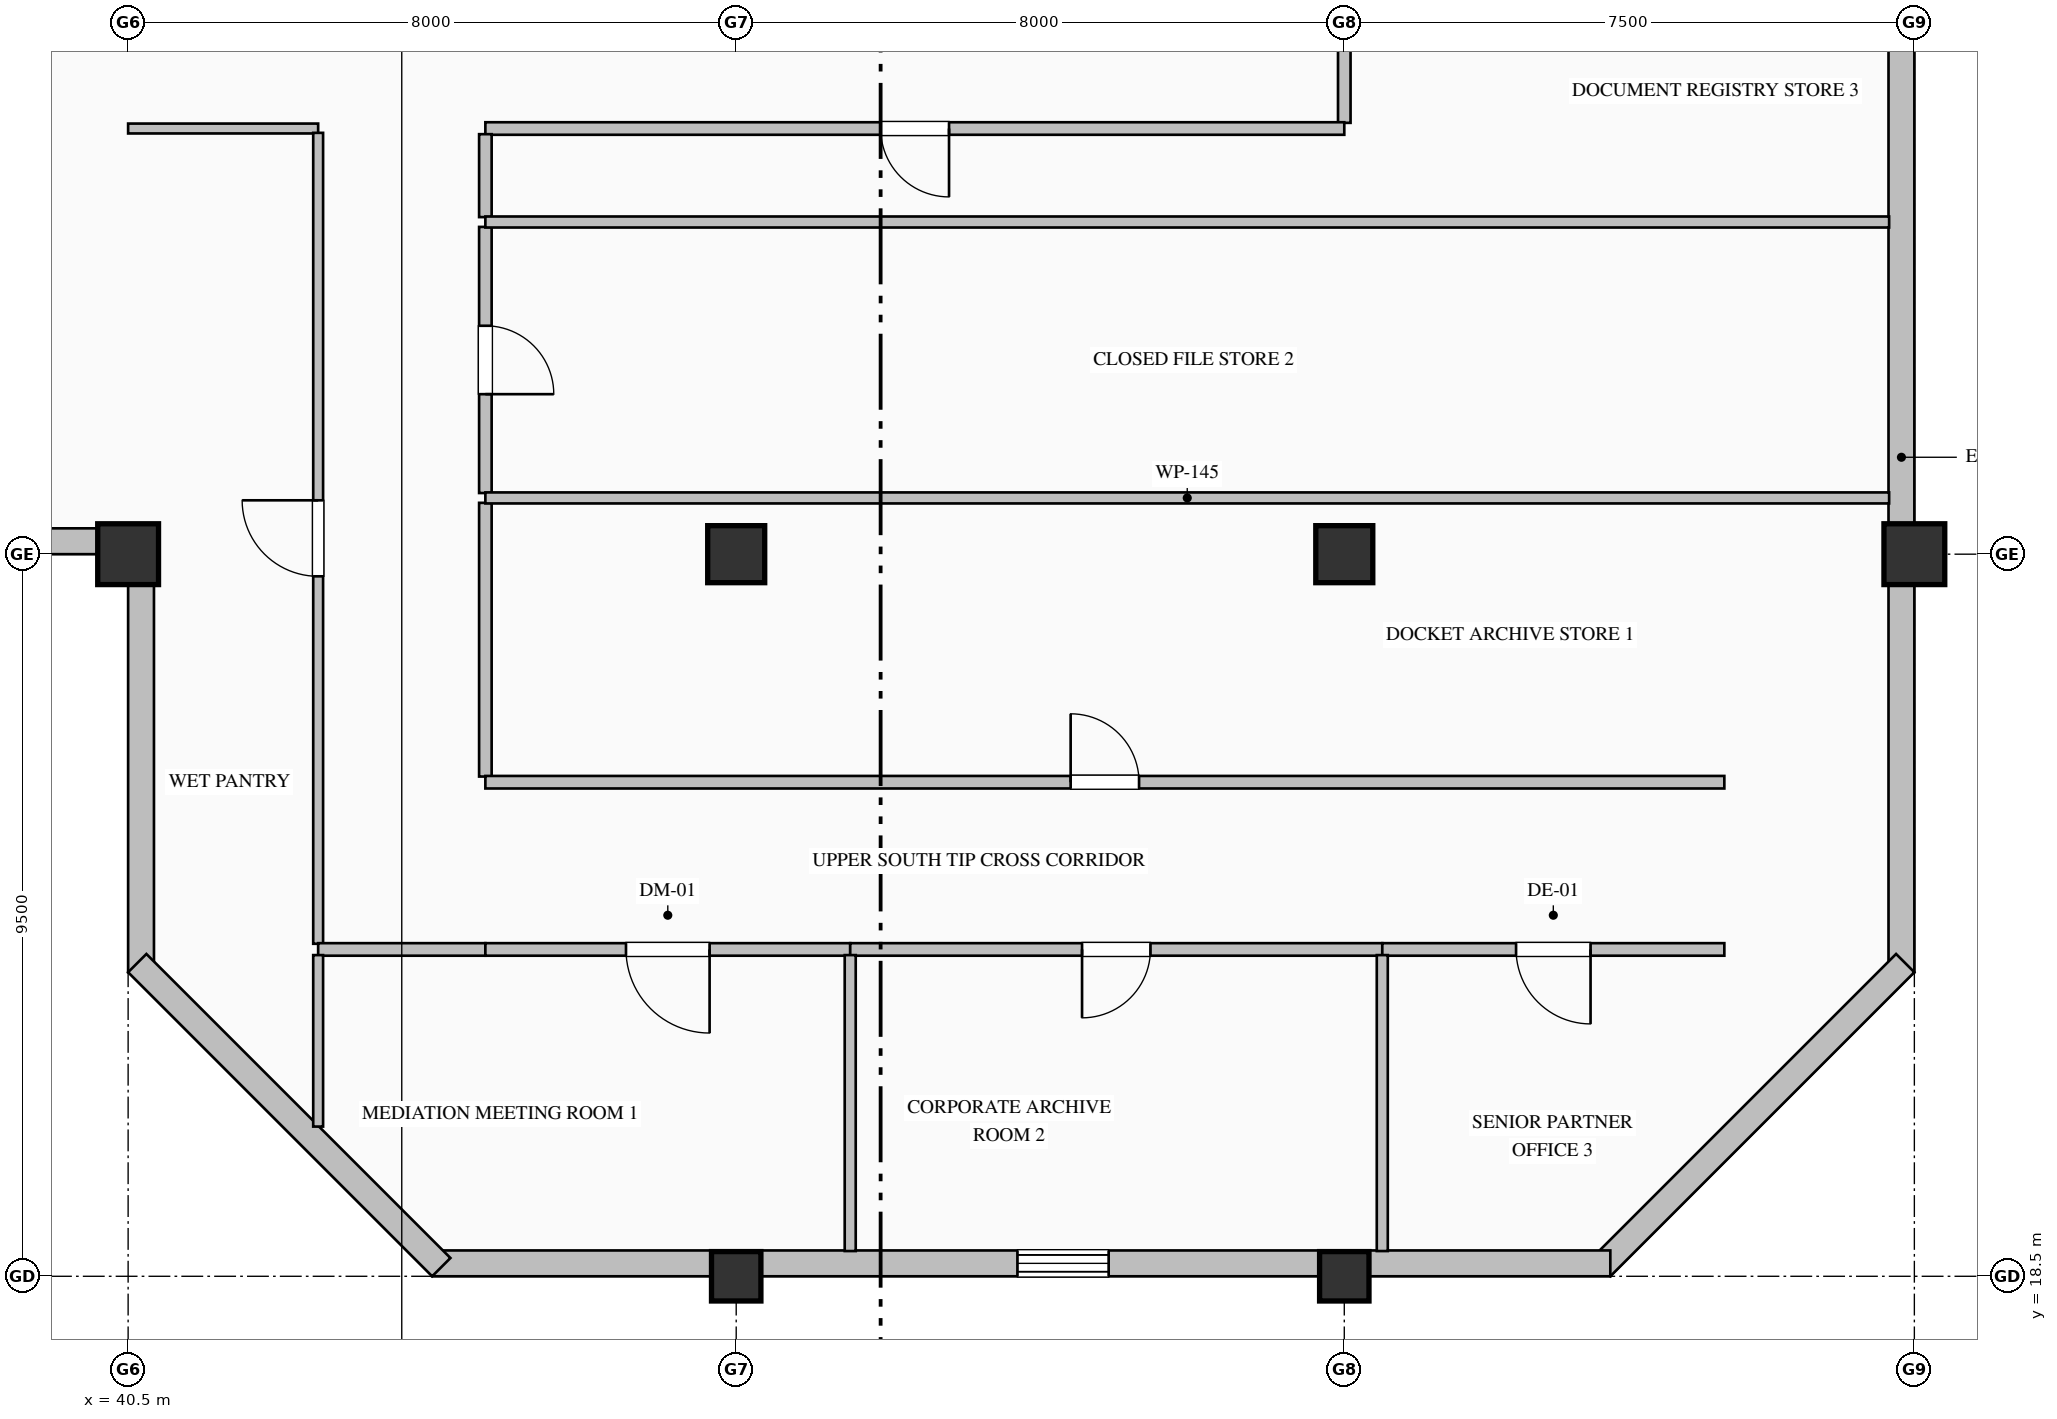
"""IFC4 building model, lengths in metres.
Left out: names, types, materials, properties, quantities, classifications, styles, units other than length and angle.
Written with IfcOpenShell. Run it as: python <this file> out.ifc"""

import sys

from ifc_helpers import new_model, si_unit, direction, frame, frame_2d, origin, origin_2d, place, context, subcontext, project, spatial, rectangle, hollow_rectangle, extrude, element, fill, save


model = new_model("IFC4")
c1 = context("Model", 3, precision=1e-05, world=origin(), true_north=direction((0.0, 1.0)))
c2 = subcontext(c1, "Body", "Model", "MODEL_VIEW")
j1 = project(units=[si_unit("LENGTHUNIT", "METRE"), si_unit("PLANEANGLEUNIT", "RADIAN")], contexts=[c1])
p1 = place(None, origin())
s1 = spatial("IfcSite", under=j1, at=p1, CompositionType="ELEMENT")
p2 = place(p1, origin())
s2 = spatial("IfcBuilding", under=s1, at=p2, CompositionType="ELEMENT")
p3 = place(p2, frame((0.0, 0.0, 363.2)))
s3 = spatial("IfcBuildingStorey", under=s2, at=p3, CompositionType="ELEMENT", Elevation=363.2)
p4 = place(p3, frame((40.5, 28.0, 0.0), z_axis=(0.0, 0.0, 1.0), x_axis=(1.0, 0.0, 0.0)))
e1 = element("IfcColumn", 1, at=p4, inside=s3, PredefinedType="COLUMN", context=c2, shape_type="SweptSolid", body=[
    extrude(hollow_rectangle(XDim=0.8, YDim=0.8, WallThickness=0.032, at=origin_2d()), origin(), (0.0, 0.0, 1.0), 4.0),
])
p5 = place(p3, frame((48.5, 18.5, 0.0), z_axis=(0.0, 0.0, 1.0), x_axis=(1.0, 0.0, 0.0)))
e2 = element("IfcColumn", 2, at=p5, inside=s3, PredefinedType="COLUMN", context=c2, shape_type="SweptSolid", body=[
    extrude(hollow_rectangle(XDim=0.65, YDim=0.65, WallThickness=0.028, at=origin_2d()), origin(), (0.0, 0.0, 1.0), 4.0),
])
p6 = place(p3, frame((48.5, 28.0, 0.0), z_axis=(0.0, 0.0, 1.0), x_axis=(1.0, 0.0, 0.0)))
e3 = element("IfcColumn", 3, at=p6, inside=s3, PredefinedType="COLUMN", context=c2, shape_type="SweptSolid", body=[
    extrude(rectangle(XDim=0.75, YDim=0.75, at=origin_2d()), origin(), (0.0, 0.0, 1.0), 4.0),
])
p7 = place(p3, frame((56.5, 18.5, 0.0), z_axis=(0.0, 0.0, 1.0), x_axis=(1.0, 0.0, 0.0)))
e4 = element("IfcColumn", 4, at=p7, inside=s3, PredefinedType="COLUMN", context=c2, shape_type="SweptSolid", body=[
    extrude(hollow_rectangle(XDim=0.65, YDim=0.65, WallThickness=0.028, at=origin_2d()), origin(), (0.0, 0.0, 1.0), 4.0),
])
p8 = place(p3, frame((56.5, 28.0, 0.0), z_axis=(0.0, 0.0, 1.0), x_axis=(1.0, 0.0, 0.0)))
e5 = element("IfcColumn", 5, at=p8, inside=s3, PredefinedType="COLUMN", context=c2, shape_type="SweptSolid", body=[
    extrude(rectangle(XDim=0.75, YDim=0.75, at=origin_2d()), origin(), (0.0, 0.0, 1.0), 4.0),
])
p9 = place(p3, frame((64.0, 28.0, 0.0), z_axis=(0.0, 0.0, 1.0), x_axis=(1.0, 0.0, 0.0)))
e6 = element("IfcColumn", 6, at=p9, inside=s3, PredefinedType="COLUMN", context=c2, shape_type="SweptSolid", body=[
    extrude(hollow_rectangle(XDim=0.8, YDim=0.8, WallThickness=0.032, at=origin_2d()), origin(), (0.0, 0.0, 1.0), 4.0),
])
p10 = place(p3, frame((40.67, 22.5, 0.0), z_axis=(0.0, 0.0, 1.0), x_axis=(0.0, 1.0, 0.0)))
e7 = element("IfcWall", 7, at=p10, inside=s3, PredefinedType="SOLIDWALL", context=c2, shape_type="SweptSolid", body=[
    extrude(rectangle(XDim=5.84, YDim=0.34, at=frame_2d((2.92, 0.0))), origin(), (0.0, 0.0, 1.0), 2.98),
])
p11 = place(p3, frame((40.52, 28.17, 0.0), z_axis=(0.0, 0.0, 1.0), x_axis=(-1.0, 0.0, 0.0)))
e8 = element("IfcWall", 8, at=p11, inside=s3, PredefinedType="SOLIDWALL", context=c2, shape_type="SweptSolid", body=[
    extrude(rectangle(XDim=20.02, YDim=0.34, at=frame_2d((10.01, 0.0))), origin(), (0.0, 0.0, 1.0), 2.98),
])
p12 = place(p11, frame((2.925, 0.0, 0.9)))
e9 = element("IfcOpeningElement", 9, at=p12, cuts=e8, PredefinedType="OPENING", context=c2, shape_type="SweptSolid", body=[
    extrude(rectangle(XDim=1.35, YDim=1.85, at=frame_2d((0.675, 0.925))), frame((0.0, 0.18, 0.0), z_axis=(0.0, -1.0, 0.0), x_axis=(1.0, 0.0, 0.0)), (0.0, 0.0, 1.0), 0.36),
])
p13 = place(p11, frame((13.725, 0.0, 0.9)))
e10 = element("IfcOpeningElement", 10, at=p13, cuts=e8, PredefinedType="OPENING", context=c2, shape_type="SweptSolid", body=[
    extrude(rectangle(XDim=1.35, YDim=1.85, at=frame_2d((0.675, 0.925))), frame((0.0, 0.18, 0.0), z_axis=(0.0, -1.0, 0.0), x_axis=(1.0, 0.0, 0.0)), (0.0, 0.0, 1.0), 0.36),
])
p14 = place(p3, frame((63.83, 36.05, 0.0), z_axis=(0.0, 0.0, 1.0), x_axis=(0.0, -1.0, 0.0)))
e11 = element("IfcWall", 11, at=p14, inside=s3, PredefinedType="SOLIDWALL", context=c2, shape_type="SweptSolid", body=[
    extrude(rectangle(XDim=13.55, YDim=0.34, at=frame_2d((6.775, 0.0))), origin(), (0.0, 0.0, 1.0), 3.13),
])
p15 = place(p3, frame((63.88, 22.62, 0.0), z_axis=(0.0, 0.0, 1.0), x_axis=(-0.707106781187, -0.707106781187, 0.0)))
e12 = element("IfcWall", 12, at=p15, inside=s3, PredefinedType="SOLIDWALL", context=c2, shape_type="SweptSolid", body=[
    extrude(rectangle(XDim=5.657, YDim=0.34, at=frame_2d((2.828, 0.0))), origin(), (0.0, 0.0, 1.0), 3.58),
])
p16 = place(p3, frame((60.0, 18.67, 0.0), z_axis=(0.0, 0.0, 1.0), x_axis=(-1.0, 0.0, 0.0)))
e13 = element("IfcWall", 13, at=p16, inside=s3, PredefinedType="SOLIDWALL", context=c2, shape_type="SweptSolid", body=[
    extrude(rectangle(XDim=15.5, YDim=0.34, at=frame_2d((7.75, 0.0))), origin(), (0.0, 0.0, 1.0), 3.13),
])
p17 = place(p16, frame((6.6, 0.0, 0.7)))
e14 = element("IfcOpeningElement", 14, at=p17, cuts=e13, PredefinedType="OPENING", context=c2, shape_type="SweptSolid", body=[
    extrude(rectangle(XDim=1.2, YDim=1.85, at=frame_2d((0.6, 0.925))), frame((0.0, 0.18, 0.0), z_axis=(0.0, -1.0, 0.0), x_axis=(1.0, 0.0, 0.0)), (0.0, 0.0, 1.0), 0.36),
])
p18 = place(p3, frame((44.62, 18.62, 0.0), z_axis=(0.0, 0.0, 1.0), x_axis=(-0.707106781187, 0.707106781187, 0.0)))
e15 = element("IfcWall", 15, at=p18, inside=s3, PredefinedType="SOLIDWALL", context=c2, shape_type="SweptSolid", body=[
    extrude(rectangle(XDim=5.657, YDim=0.34, at=frame_2d((2.828, 0.0))), origin(), (0.0, 0.0, 1.0), 3.58),
])
p19 = place(p3, frame((56.5, 36.0, 0.0), z_axis=(0.0, 0.0, 1.0), x_axis=(0.0, -1.0, 0.0)))
e16 = element("IfcWall", 16, at=p19, inside=s3, PredefinedType="PARTITIONING", context=c2, shape_type="SweptSolid", body=[
    extrude(rectangle(XDim=2.325, YDim=0.165, at=frame_2d((1.163, 0.0))), origin(), (0.0, 0.0, 1.0), 2.972),
])
p20 = place(p3, frame((56.5, 33.6, 0.0), z_axis=(0.0, 0.0, 1.0), x_axis=(-1.0, 0.0, 0.0)))
e17 = element("IfcWall", 17, at=p20, inside=s3, PredefinedType="PARTITIONING", context=c2, shape_type="SweptSolid", body=[
    extrude(rectangle(XDim=11.3, YDim=0.165, at=frame_2d((5.65, 0.0))), origin(), (0.0, 0.0, 1.0), 3.58),
])
p21 = place(p20, frame((5.2, 0.0, 0.0)))
e18 = element("IfcOpeningElement", 18, at=p21, cuts=e17, PredefinedType="OPENING", context=c2, shape_type="SweptSolid", body=[
    extrude(rectangle(XDim=0.9, YDim=2.15, at=frame_2d((0.45, 1.075))), frame((0.0, 0.093, 0.0), z_axis=(0.0, -1.0, 0.0), x_axis=(1.0, 0.0, 0.0)), (0.0, 0.0, 1.0), 0.185),
])
p22 = place(p3, frame((43.0, 33.6, 0.0), z_axis=(0.0, 0.0, 1.0), x_axis=(-1.0, 0.0, 0.0)))
e19 = element("IfcWall", 19, at=p22, inside=s3, PredefinedType="PARTITIONING", context=c2, shape_type="SweptSolid", body=[
    extrude(rectangle(XDim=2.5, YDim=0.13, at=frame_2d((1.25, 0.0))), origin(), (0.0, 0.0, 1.0), 3.58),
])
p23 = place(p3, frame((45.2, 28.676, 0.0), z_axis=(0.0, 0.0, 1.0), x_axis=(0.0, -1.0, 0.0)))
e20 = element("IfcWall", 20, at=p23, inside=s3, PredefinedType="PARTITIONING", context=c2, shape_type="SweptSolid", body=[
    extrude(rectangle(XDim=3.601, YDim=0.165, at=frame_2d((1.801, 0.0))), origin(), (0.0, 0.0, 1.0), 3.58),
])
p24 = place(p3, frame((45.2, 32.305, 0.0), z_axis=(0.0, 0.0, 1.0), x_axis=(0.0, -1.0, 0.0)))
e21 = element("IfcWall", 21, at=p24, inside=s3, PredefinedType="PARTITIONING", context=c2, shape_type="SweptSolid", body=[
    extrude(rectangle(XDim=3.501, YDim=0.165, at=frame_2d((1.75, 0.0))), origin(), (0.0, 0.0, 1.0), 3.58),
])
p25 = place(p24, frame((1.301, 0.0, 0.0)))
e22 = element("IfcOpeningElement", 22, at=p25, cuts=e21, PredefinedType="OPENING", context=c2, shape_type="SweptSolid", body=[
    extrude(rectangle(XDim=0.9, YDim=2.15, at=frame_2d((0.45, 1.075))), frame((0.0, 0.093, 0.0), z_axis=(0.0, -1.0, 0.0), x_axis=(1.0, 0.0, 0.0)), (0.0, 0.0, 1.0), 0.185),
])
p26 = place(p3, frame((45.2, 33.525, 0.0), z_axis=(0.0, 0.0, 1.0), x_axis=(0.0, -1.0, 0.0)))
e23 = element("IfcWall", 23, at=p26, inside=s3, PredefinedType="PARTITIONING", context=c2, shape_type="SweptSolid", body=[
    extrude(rectangle(XDim=1.091, YDim=0.165, at=frame_2d((0.545, 0.0))), origin(), (0.0, 0.0, 1.0), 3.58),
])
p27 = place(p3, frame((43.0, 22.875, 0.0), z_axis=(0.0, 0.0, 1.0), x_axis=(0.0, 1.0, 0.0)))
e24 = element("IfcWall", 24, at=p27, inside=s3, PredefinedType="PARTITIONING", context=c2, shape_type="SweptSolid", body=[
    extrude(rectangle(XDim=10.668, YDim=0.13, at=frame_2d((5.334, 0.0))), origin(), (0.0, 0.0, 1.0), 3.58),
])
p28 = place(p27, frame((4.834, 0.0, 0.0)))
e25 = element("IfcOpeningElement", 25, at=p28, cuts=e24, PredefinedType="OPENING", context=c2, shape_type="SweptSolid", body=[
    extrude(rectangle(XDim=1.0, YDim=2.15, at=frame_2d((0.5, 1.075))), frame((0.0, 0.075, 0.0), z_axis=(0.0, -1.0, 0.0), x_axis=(1.0, 0.0, 0.0)), (0.0, 0.0, 1.0), 0.15),
])
p29 = place(p3, frame((45.2, 22.8, 0.0), z_axis=(0.0, 0.0, 1.0), x_axis=(-1.0, 0.0, 0.0)))
e26 = element("IfcWall", 26, at=p29, inside=s3, PredefinedType="PARTITIONING", context=c2, shape_type="SweptSolid", body=[
    extrude(rectangle(XDim=2.2, YDim=0.165, at=frame_2d((1.1, 0.0))), origin(), (0.0, 0.0, 1.0), 3.58),
])
p30 = place(p3, frame((45.2, 25.0, 0.0), z_axis=(0.0, 0.0, 1.0), x_axis=(1.0, 0.0, 0.0)))
e27 = element("IfcWall", 27, at=p30, inside=s3, PredefinedType="PARTITIONING", context=c2, shape_type="SweptSolid", body=[
    extrude(rectangle(XDim=16.3, YDim=0.165, at=frame_2d((8.15, 0.0))), origin(), (0.0, 0.0, 1.0), 3.58),
])
p31 = place(p30, frame((7.7, 0.0, 0.0)))
e28 = element("IfcOpeningElement", 28, at=p31, cuts=e27, PredefinedType="OPENING", context=c2, shape_type="SweptSolid", body=[
    extrude(rectangle(XDim=0.9, YDim=2.15, at=frame_2d((0.45, 1.075))), frame((0.0, 0.093, 0.0), z_axis=(0.0, -1.0, 0.0), x_axis=(1.0, 0.0, 0.0)), (0.0, 0.0, 1.0), 0.185),
])
p32 = place(p3, frame((50.0, 22.8, 0.0), z_axis=(0.0, 0.0, 1.0), x_axis=(-1.0, 0.0, 0.0)))
e29 = element("IfcWall", 29, at=p32, inside=s3, PredefinedType="PARTITIONING", context=c2, shape_type="SweptSolid", body=[
    extrude(rectangle(XDim=4.8, YDim=0.165, at=frame_2d((2.4, 0.0))), origin(), (0.0, 0.0, 1.0), 3.58),
])
p33 = place(p32, frame((1.85, 0.0, 0.0)))
e30 = element("IfcOpeningElement", 30, at=p33, cuts=e29, PredefinedType="OPENING", context=c2, shape_type="SweptSolid", body=[
    extrude(rectangle(XDim=1.1, YDim=2.2, at=frame_2d((0.55, 1.1))), frame((0.0, 0.093, 0.0), z_axis=(0.0, -1.0, 0.0), x_axis=(1.0, 0.0, 0.0)), (0.0, 0.0, 1.0), 0.185),
])
p34 = place(p3, frame((57.0, 22.8, 0.0), z_axis=(0.0, 0.0, 1.0), x_axis=(-1.0, 0.0, 0.0)))
e31 = element("IfcWall", 31, at=p34, inside=s3, PredefinedType="PARTITIONING", context=c2, shape_type="SweptSolid", body=[
    extrude(rectangle(XDim=7.0, YDim=0.165, at=frame_2d((3.5, 0.0))), origin(), (0.0, 0.0, 1.0), 3.58),
])
p35 = place(p34, frame((3.05, 0.0, 0.0)))
e32 = element("IfcOpeningElement", 32, at=p35, cuts=e31, PredefinedType="OPENING", context=c2, shape_type="SweptSolid", body=[
    extrude(rectangle(XDim=0.9, YDim=2.15, at=frame_2d((0.45, 1.075))), frame((0.0, 0.093, 0.0), z_axis=(0.0, -1.0, 0.0), x_axis=(1.0, 0.0, 0.0)), (0.0, 0.0, 1.0), 0.185),
])
p36 = place(p3, frame((61.5, 22.8, 0.0), z_axis=(0.0, 0.0, 1.0), x_axis=(-1.0, 0.0, 0.0)))
e33 = element("IfcWall", 33, at=p36, inside=s3, PredefinedType="PARTITIONING", context=c2, shape_type="SweptSolid", body=[
    extrude(rectangle(XDim=4.5, YDim=0.165, at=frame_2d((2.25, 0.0))), origin(), (0.0, 0.0, 1.0), 3.58),
])
p37 = place(p36, frame((1.76, 0.0, 0.0)))
e34 = element("IfcOpeningElement", 34, at=p37, cuts=e33, PredefinedType="OPENING", context=c2, shape_type="SweptSolid", body=[
    extrude(rectangle(XDim=0.98, YDim=2.25, at=frame_2d((0.49, 1.125))), frame((0.0, 0.093, 0.0), z_axis=(0.0, -1.0, 0.0), x_axis=(1.0, 0.0, 0.0)), (0.0, 0.0, 1.0), 0.185),
])
for number, where, z_axis, x_axis in (
    (35, (45.2, 28.74, 0.0), (0.0, 0.0, 1.0), (1.0, 0.0, 0.0)),
    (36, (45.2, 32.37, 0.0), (0.0, 0.0, 1.0), (1.0, 0.0, 0.0)),
):
    element("IfcWall", number, at=place(p3, frame(where, z_axis=z_axis, x_axis=x_axis)), inside=s3, PredefinedType="PARTITIONING", context=c2, shape_type="SweptSolid", body=[
        extrude(rectangle(XDim=18.468, YDim=0.145, at=frame_2d((9.234, 0.0))), origin(), (0.0, 0.0, 1.0), 3.58),
    ])
p38 = place(p3, frame((43.0, 22.726, 0.0), z_axis=(0.0, 0.0, 1.0), x_axis=(0.0, -1.0, 0.0)))
e37 = element("IfcWall", 37, at=p38, inside=s3, PredefinedType="PARTITIONING", context=c2, shape_type="SweptSolid", body=[
    extrude(rectangle(XDim=2.256, YDim=0.13, at=frame_2d((1.128, 0.0))), origin(), (0.0, 0.0, 1.0), 3.58),
])
for number, where, z_axis, x_axis in (
    (38, (50.0, 22.726, 0.0), (0.0, 0.0, 1.0), (0.0, -1.0, 0.0)),
    (39, (57.0, 22.726, 0.0), (0.0, 0.0, 1.0), (0.0, -1.0, 0.0)),
):
    element("IfcWall", number, at=place(p3, frame(where, z_axis=z_axis, x_axis=x_axis)), inside=s3, PredefinedType="PARTITIONING", context=c2, shape_type="SweptSolid", body=[
        extrude(rectangle(XDim=3.894, YDim=0.145, at=frame_2d((1.947, 0.0))), origin(), (0.0, 0.0, 1.0), 3.58),
    ])
p39 = place(p17, origin())
e40 = element("IfcWindow", 40, at=p39, inside=s3, PartitioningType="DOUBLE_PANEL_VERTICAL", PredefinedType="WINDOW", context=c2, shape_type="SweptSolid", body=[
    extrude(rectangle(XDim=1.2, YDim=1.85, at=frame_2d((0.6, 0.925))), frame((0.0, 0.15, 0.0), z_axis=(0.0, -1.0, 0.0), x_axis=(1.0, 0.0, 0.0)), (0.0, 0.0, 1.0), 0.06),
])
fill(e14, e40)
p40 = place(p31, origin())
e41 = element("IfcDoor", 41, at=p40, inside=s3, OperationType="SINGLE_SWING_LEFT", PredefinedType="DOOR", context=c2, shape_type="SweptSolid", body=[
    extrude(rectangle(XDim=0.9, YDim=2.15, at=frame_2d((0.45, 1.075))), frame((0.0, 0.025, 0.0), z_axis=(0.0, -1.0, 0.0), x_axis=(1.0, 0.0, 0.0)), (0.0, 0.0, 1.0), 0.05),
])
fill(e28, e41)
p41 = place(p25, origin())
e42 = element("IfcDoor", 42, at=p41, inside=s3, OperationType="SINGLE_SWING_RIGHT", PredefinedType="DOOR", context=c2, shape_type="SweptSolid", body=[
    extrude(rectangle(XDim=0.9, YDim=2.15, at=frame_2d((0.45, 1.075))), frame((0.0, 0.025, 0.0), z_axis=(0.0, -1.0, 0.0), x_axis=(1.0, 0.0, 0.0)), (0.0, 0.0, 1.0), 0.05),
])
fill(e22, e42)
p42 = place(p21, origin())
e43 = element("IfcDoor", 43, at=p42, inside=s3, OperationType="SINGLE_SWING_LEFT", PredefinedType="DOOR", context=c2, shape_type="SweptSolid", body=[
    extrude(rectangle(XDim=0.9, YDim=2.15, at=frame_2d((0.45, 1.075))), frame((0.0, 0.025, 0.0), z_axis=(0.0, -1.0, 0.0), x_axis=(1.0, 0.0, 0.0)), (0.0, 0.0, 1.0), 0.05),
])
fill(e18, e43)
p43 = place(p28, origin())
e44 = element("IfcDoor", 44, at=p43, inside=s3, OperationType="SINGLE_SWING_RIGHT", PredefinedType="DOOR", context=c2, shape_type="SweptSolid", body=[
    extrude(rectangle(XDim=1.0, YDim=2.15, at=frame_2d((0.5, 1.075))), frame((0.0, 0.025, 0.0), z_axis=(0.0, -1.0, 0.0), x_axis=(1.0, 0.0, 0.0)), (0.0, 0.0, 1.0), 0.05),
])
fill(e25, e44)
p44 = place(p33, origin())
e45 = element("IfcDoor", 45, at=p44, inside=s3, OperationType="SINGLE_SWING_LEFT", PredefinedType="DOOR", context=c2, shape_type="SweptSolid", body=[
    extrude(rectangle(XDim=1.1, YDim=2.2, at=frame_2d((0.55, 1.1))), frame((0.0, 0.025, 0.0), z_axis=(0.0, -1.0, 0.0), x_axis=(1.0, 0.0, 0.0)), (0.0, 0.0, 1.0), 0.05),
])
fill(e30, e45)
p45 = place(p35, origin())
e46 = element("IfcDoor", 46, at=p45, inside=s3, OperationType="SINGLE_SWING_RIGHT", PredefinedType="DOOR", context=c2, shape_type="SweptSolid", body=[
    extrude(rectangle(XDim=0.9, YDim=2.15, at=frame_2d((0.45, 1.075))), frame((0.0, 0.025, 0.0), z_axis=(0.0, -1.0, 0.0), x_axis=(1.0, 0.0, 0.0)), (0.0, 0.0, 1.0), 0.05),
])
fill(e32, e46)
p46 = place(p37, origin())
e47 = element("IfcDoor", 47, at=p46, inside=s3, OperationType="SINGLE_SWING_LEFT", PredefinedType="DOOR", context=c2, shape_type="SweptSolid", body=[
    extrude(rectangle(XDim=0.98, YDim=2.25, at=frame_2d((0.49, 1.125))), frame((0.0, 0.025, 0.0), z_axis=(0.0, -1.0, 0.0), x_axis=(1.0, 0.0, 0.0)), (0.0, 0.0, 1.0), 0.05),
])
fill(e34, e47)
save(model, sys.argv[1])
